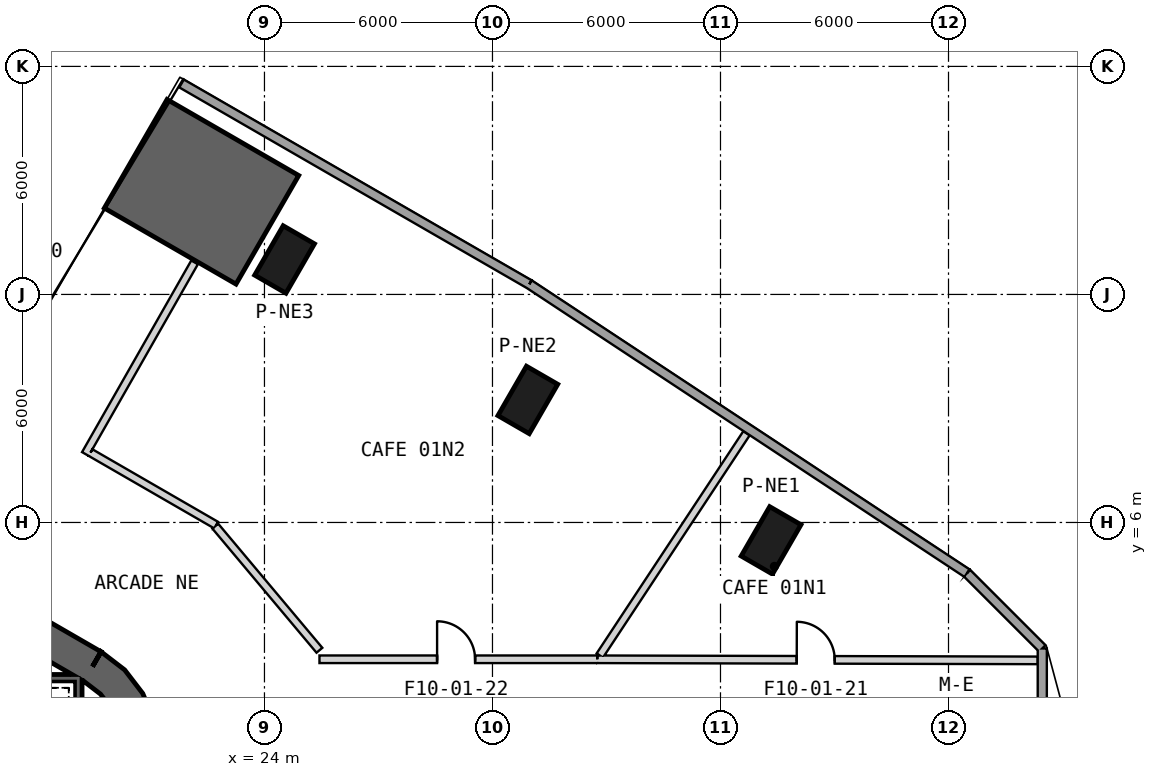
"""IFC4 building model, lengths in metres.
Left out: names, types, materials, properties, quantities, classifications, styles, units other than length and angle.
Written with IfcOpenShell. Run it as: python <this file> out.ifc"""

import sys

from ifc_helpers import new_model, si_unit, direction, frame, frame_2d, origin, origin_2d, place, context, subcontext, project, spatial, polyline, rectangle, outline, extrude, element, fill, save


model = new_model("IFC4")
c1 = context("Model", 3, precision=1e-05, world=origin(), true_north=direction((0.0, 1.0)))
c2 = subcontext(c1, "Body", "Model", "MODEL_VIEW")
j1 = project(units=[si_unit("LENGTHUNIT", "METRE"), si_unit("PLANEANGLEUNIT", "RADIAN")], contexts=[c1])
p1 = place(None, origin())
s1 = spatial("IfcSite", under=j1, at=p1, CompositionType="ELEMENT")
p2 = place(p1, origin())
s2 = spatial("IfcBuilding", under=s1, at=p2, CompositionType="ELEMENT")
p3 = place(p2, frame((0.0, 0.0, 9.0)))
s3 = spatial("IfcBuildingStorey", under=s2, at=p3, CompositionType="ELEMENT", Elevation=9.0)
for number, where, z_axis, x_axis in (
    (1, (37.331, 5.528, 0.0), (0.0, 0.0, 1.0), (0.5, 0.866, 0.0)),
    (2, (30.93, 9.224, 0.0), (0.0, 0.0, 1.0), (0.5, 0.866, 0.0)),
    (3, (24.529, 12.92, 0.0), (0.0, 0.0, 1.0), (0.5, 0.866, 0.0)),
):
    element("IfcColumn", number, at=place(p3, frame(where, z_axis=z_axis, x_axis=x_axis)), inside=s3, PredefinedType="COLUMN", context=c2, shape_type="SweptSolid", body=[
        extrude(rectangle(XDim=1.5, YDim=0.95, at=origin_2d()), origin(), (0.0, 0.0, 1.0), 6.5),
    ])
p4 = place(p3, frame((19.475, 2.208, 0.0), z_axis=(0.0, 0.0, 1.0), x_axis=(-0.866028369851, 0.499994862586, 0.0)))
e4 = element("IfcWall", 4, at=p4, inside=s3, PredefinedType="SHEAR", context=c2, shape_type="SweptSolid", body=[
    extrude(rectangle(XDim=31.523, YDim=0.9, at=frame_2d((15.762, 0.0))), origin(), (0.0, 0.0, 1.0), 6.5),
])
p5 = place(p4, frame((7.062, 0.0, 0.0)))
e5 = element("IfcOpeningElement", 5, at=p5, cuts=e4, PredefinedType="OPENING", context=c2, shape_type="SweptSolid", body=[
    extrude(rectangle(XDim=1.2, YDim=2.4, at=frame_2d((0.6, 1.2))), frame((0.0, 0.46, 0.0), z_axis=(0.0, -1.0, 0.0), x_axis=(1.0, 0.0, 0.0)), (0.0, 0.0, 1.0), 0.92),
])
p6 = place(p4, frame((9.762, 0.0, 0.0)))
e6 = element("IfcOpeningElement", 6, at=p6, cuts=e4, PredefinedType="OPENING", context=c2, shape_type="SweptSolid", body=[
    extrude(rectangle(XDim=1.2, YDim=2.4, at=frame_2d((0.6, 1.2))), frame((0.0, 0.46, 0.0), z_axis=(0.0, -1.0, 0.0), x_axis=(1.0, 0.0, 0.0)), (0.0, 0.0, 1.0), 0.92),
])
p7 = place(p4, frame((12.462, 0.0, 0.0)))
e7 = element("IfcOpeningElement", 7, at=p7, cuts=e4, PredefinedType="OPENING", context=c2, shape_type="SweptSolid", body=[
    extrude(rectangle(XDim=1.2, YDim=2.4, at=frame_2d((0.6, 1.2))), frame((0.0, 0.46, 0.0), z_axis=(0.0, -1.0, 0.0), x_axis=(1.0, 0.0, 0.0)), (0.0, 0.0, 1.0), 0.92),
])
p8 = place(p4, frame((15.162, 0.0, 0.0)))
e8 = element("IfcOpeningElement", 8, at=p8, cuts=e4, PredefinedType="OPENING", context=c2, shape_type="SweptSolid", body=[
    extrude(rectangle(XDim=1.2, YDim=2.4, at=frame_2d((0.6, 1.2))), frame((0.0, 0.46, 0.0), z_axis=(0.0, -1.0, 0.0), x_axis=(1.0, 0.0, 0.0)), (0.0, 0.0, 1.0), 0.92),
])
p9 = place(p4, frame((17.862, 0.0, 0.0)))
e9 = element("IfcOpeningElement", 9, at=p9, cuts=e4, PredefinedType="OPENING", context=c2, shape_type="SweptSolid", body=[
    extrude(rectangle(XDim=1.2, YDim=2.4, at=frame_2d((0.6, 1.2))), frame((0.0, 0.46, 0.0), z_axis=(0.0, -1.0, 0.0), x_axis=(1.0, 0.0, 0.0)), (0.0, 0.0, 1.0), 0.92),
])
p10 = place(p4, frame((20.562, 0.0, 0.0)))
e10 = element("IfcOpeningElement", 10, at=p10, cuts=e4, PredefinedType="OPENING", context=c2, shape_type="SweptSolid", body=[
    extrude(rectangle(XDim=1.2, YDim=2.4, at=frame_2d((0.6, 1.2))), frame((0.0, 0.46, 0.0), z_axis=(0.0, -1.0, 0.0), x_axis=(1.0, 0.0, 0.0)), (0.0, 0.0, 1.0), 0.92),
])
p11 = place(p4, frame((23.262, 0.0, 0.0)))
e11 = element("IfcOpeningElement", 11, at=p11, cuts=e4, PredefinedType="OPENING", context=c2, shape_type="SweptSolid", body=[
    extrude(rectangle(XDim=1.2, YDim=2.4, at=frame_2d((0.6, 1.2))), frame((0.0, 0.46, 0.0), z_axis=(0.0, -1.0, 0.0), x_axis=(1.0, 0.0, 0.0)), (0.0, 0.0, 1.0), 0.92),
])
p12 = place(p4, frame((3.612, 0.0, 0.0)))
e12 = element("IfcOpeningElement", 12, at=p12, cuts=e4, PredefinedType="OPENING", context=c2, shape_type="SweptSolid", body=[
    extrude(rectangle(XDim=1.2, YDim=2.4, at=frame_2d((0.6, 1.2))), frame((0.0, 0.46, 0.0), z_axis=(0.0, -1.0, 0.0), x_axis=(1.0, 0.0, 0.0)), (0.0, 0.0, 1.0), 0.92),
])
p13 = place(p4, frame((26.712, 0.0, 0.0)))
e13 = element("IfcOpeningElement", 13, at=p13, cuts=e4, PredefinedType="OPENING", context=c2, shape_type="SweptSolid", body=[
    extrude(rectangle(XDim=1.2, YDim=2.4, at=frame_2d((0.6, 1.2))), frame((0.0, 0.46, 0.0), z_axis=(0.0, -1.0, 0.0), x_axis=(1.0, 0.0, 0.0)), (0.0, 0.0, 1.0), 0.92),
])
p14 = place(p3, origin())
e14 = element("IfcWall", 14, at=p14, inside=s3, PredefinedType="SHEAR", context=c2, shape_type="SweptSolid", body=[
    extrude(outline(polyline([(19.7, -2.598), (20.321, -2.121), (20.798, -1.5), (21.098, -0.777), (21.2, 0.0), (21.098, 0.777), (20.798, 1.5), (20.321, 2.121), (19.7, 2.598), (19.25, 1.819), (19.685, 1.485), (20.019, 1.05), (20.229, 0.543), (20.3, 0.0), (20.229, -0.543), (20.019, -1.05), (19.685, -1.485), (19.25, -1.819), (19.7, -2.598)])), origin(), (0.0, 0.0, 1.0), 6.5),
])
p15 = place(p3, origin())
e15 = element("IfcWall", 15, at=p15, inside=s3, PredefinedType="SHEAR", context=c2, shape_type="SweptSolid", body=[
    extrude(outline(polyline([(24.901, 15.13), (21.437, 17.13), (19.787, 14.272), (23.251, 12.272), (24.901, 15.13)])), origin(), (0.0, 0.0, 1.0), 6.5),
])
p16 = place(p3, frame((42.487, 4.666, 0.0), z_axis=(0.0, 0.0, 1.0), x_axis=(-0.834569880428, 0.550902091739, 0.0)))
e16 = element("IfcWall", 16, at=p16, inside=s3, PredefinedType="SOLIDWALL", context=c2, shape_type="SweptSolid", body=[
    extrude(rectangle(XDim=13.802, YDim=0.24, at=frame_2d((6.901, 0.0))), origin(), (0.0, 0.0, 1.0), 6.2),
])
p17 = place(p3, frame((30.969, 12.269, 0.0), z_axis=(0.0, 0.0, 1.0), x_axis=(-0.86605207128, 0.499953807697, 0.0)))
e17 = element("IfcWall", 17, at=p17, inside=s3, PredefinedType="SOLIDWALL", context=c2, shape_type="SweptSolid", body=[
    extrude(rectangle(XDim=10.566, YDim=0.24, at=frame_2d((5.283, 0.0))), origin(), (0.0, 0.0, 1.0), 6.2),
])
p18 = place(p3, frame((44.468, -2.686, 0.0), z_axis=(0.0, 0.0, 1.0), x_axis=(0.0, 1.0, 0.0)))
e18 = element("IfcWall", 18, at=p18, inside=s3, PredefinedType="SOLIDWALL", context=c2, shape_type="SweptSolid", body=[
    extrude(rectangle(XDim=5.371, YDim=0.24, at=frame_2d((2.686, 0.0))), origin(), (0.0, 0.0, 1.0), 6.2),
])
p19 = place(p3, frame((44.468, 2.686, 0.0), z_axis=(0.0, 0.0, 1.0), x_axis=(-0.707106781187, 0.707106781187, 0.0)))
e19 = element("IfcWall", 19, at=p19, inside=s3, PredefinedType="SOLIDWALL", context=c2, shape_type="SweptSolid", body=[
    extrude(rectangle(XDim=2.801, YDim=0.24, at=frame_2d((1.4, 0.0))), origin(), (0.0, 0.0, 1.0), 6.2),
])
p20 = place(p3, frame((19.2, 1.9, -0.3), z_axis=(0.0, 0.0, 1.0), x_axis=(-1.0, 0.0, 0.0)))
e20 = element("IfcWall", 20, at=p20, inside=s3, PredefinedType="SHEAR", context=c2, shape_type="SweptSolid", body=[
    extrude(rectangle(XDim=8.1, YDim=0.2, at=frame_2d((4.05, 0.0))), origin(), (0.0, 0.0, 1.0), 6.5),
])
p21 = place(p3, frame((19.1, 0.11, -0.3), z_axis=(0.0, 0.0, 1.0), x_axis=(0.0, 1.0, 0.0)))
e21 = element("IfcWall", 21, at=p21, inside=s3, PredefinedType="SHEAR", context=c2, shape_type="SweptSolid", body=[
    extrude(rectangle(XDim=1.69, YDim=0.2, at=frame_2d((0.845, 0.0))), origin(), (0.0, 0.0, 1.0), 6.5),
])
p22 = place(p3, frame((32.756, 2.4, 0.0), z_axis=(0.0, 0.0, 1.0), x_axis=(0.999996963628, -0.002464291772, 0.0)))
e22 = element("IfcWall", 22, at=p22, inside=s3, PredefinedType="PARTITIONING", context=c2, shape_type="SweptSolid", body=[
    extrude(rectangle(XDim=11.591, YDim=0.2, at=frame_2d((5.796, 0.0))), origin(), (0.0, 0.0, 1.0), 6.2),
])
p23 = place(p22, frame((5.25, 0.0, 0.0)))
e23 = element("IfcOpeningElement", 23, at=p23, cuts=e22, PredefinedType="OPENING", context=c2, shape_type="SweptSolid", body=[
    extrude(rectangle(XDim=1.0, YDim=2.1, at=frame_2d((0.5, 1.05))), frame((0.0, 0.11, 0.0), z_axis=(0.0, -1.0, 0.0), x_axis=(1.0, 0.0, 0.0)), (0.0, 0.0, 1.0), 0.22),
])
p24 = place(p3, frame((19.287, 7.802, 0.0), z_axis=(0.0, 0.0, 1.0), x_axis=(0.495232573408, 0.868760437771, 0.0)))
e24 = element("IfcWall", 24, at=p24, inside=s3, PredefinedType="PARTITIONING", context=c2, shape_type="SweptSolid", body=[
    extrude(rectangle(XDim=5.803, YDim=0.2, at=frame_2d((2.902, 0.0))), origin(), (0.0, 0.0, 1.0), 5.67),
])
p25 = place(p3, frame((22.727, 5.931, 0.0), z_axis=(0.0, 0.0, 1.0), x_axis=(-0.865993775728, 0.500054777399, 0.0)))
e25 = element("IfcWall", 25, at=p25, inside=s3, PredefinedType="PARTITIONING", context=c2, shape_type="SweptSolid", body=[
    extrude(rectangle(XDim=3.815, YDim=0.2, at=frame_2d((1.908, 0.0))), origin(), (0.0, 0.0, 1.0), 5.38),
])
p26 = place(p3, frame((25.446, 2.637, 0.0), z_axis=(0.0, 0.0, 1.0), x_axis=(-0.642821465925, 0.766016033087, 0.0)))
e26 = element("IfcWall", 26, at=p26, inside=s3, PredefinedType="PARTITIONING", context=c2, shape_type="SweptSolid", body=[
    extrude(rectangle(XDim=4.265, YDim=0.2, at=frame_2d((2.132, 0.0))), origin(), (0.0, 0.0, 1.0), 5.28),
])
p27 = place(p3, frame((25.448, 2.4, 0.0), z_axis=(0.0, 0.0, 1.0), x_axis=(0.999999999442, -3.3404596e-05, 0.0)))
e27 = element("IfcWall", 27, at=p27, inside=s3, PredefinedType="PARTITIONING", context=c2, shape_type="SweptSolid", body=[
    extrude(rectangle(XDim=7.309, YDim=0.2, at=frame_2d((3.654, 0.0))), origin(), (0.0, 0.0, 1.0), 6.2),
])
p28 = place(p27, frame((3.095, 0.0, 0.0)))
e28 = element("IfcOpeningElement", 28, at=p28, cuts=e27, PredefinedType="OPENING", context=c2, shape_type="SweptSolid", body=[
    extrude(rectangle(XDim=1.0, YDim=2.1, at=frame_2d((0.5, 1.05))), frame((0.0, 0.11, 0.0), z_axis=(0.0, -1.0, 0.0), x_axis=(1.0, 0.0, 0.0)), (0.0, 0.0, 1.0), 0.22),
])
p29 = place(p3, frame((32.825, 2.5, 0.0), z_axis=(0.0, 0.0, 1.0), x_axis=(0.550906775361, 0.834566788736, 0.0)))
e29 = element("IfcWall", 29, at=p29, inside=s3, PredefinedType="PARTITIONING", context=c2, shape_type="SweptSolid", body=[
    extrude(rectangle(XDim=7.006, YDim=0.2, at=frame_2d((3.503, 0.0))), origin(), (0.0, 0.0, 1.0), 5.28),
])
p30 = place(p23, origin())
e30 = element("IfcDoor", 30, at=p30, inside=s3, OperationType="SINGLE_SWING_LEFT", PredefinedType="USERDEFINED", context=c2, shape_type="SweptSolid", body=[
    extrude(rectangle(XDim=1.0, YDim=2.1, at=frame_2d((0.5, 1.05))), frame((0.0, 0.025, 0.0), z_axis=(0.0, -1.0, 0.0), x_axis=(1.0, 0.0, 0.0)), (0.0, 0.0, 1.0), 0.05),
])
fill(e23, e30)
p31 = place(p28, origin())
e31 = element("IfcDoor", 31, at=p31, inside=s3, OperationType="SINGLE_SWING_LEFT", PredefinedType="USERDEFINED", context=c2, shape_type="SweptSolid", body=[
    extrude(rectangle(XDim=1.0, YDim=2.1, at=frame_2d((0.5, 1.05))), frame((0.0, 0.025, 0.0), z_axis=(0.0, -1.0, 0.0), x_axis=(1.0, 0.0, 0.0)), (0.0, 0.0, 1.0), 0.05),
])
fill(e28, e31)
save(model, sys.argv[1])
